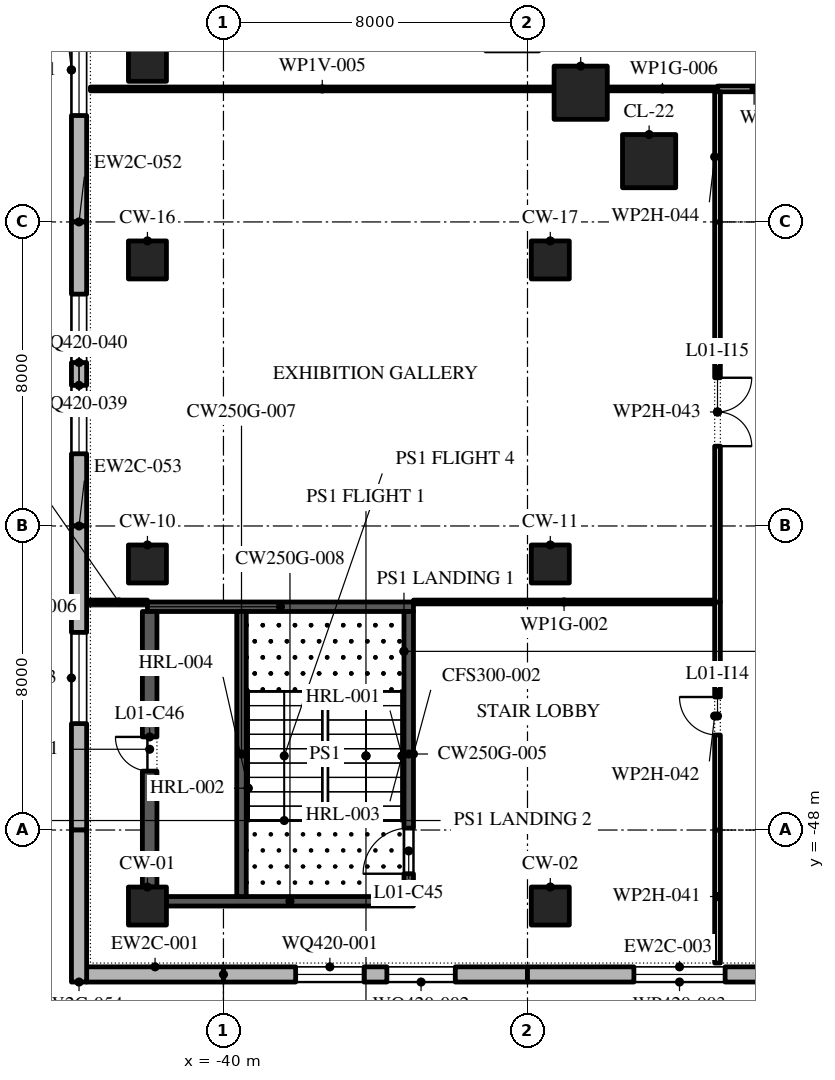
"""IFC4 building model, lengths in metres.
Left out: names, types, materials, properties, quantities, classifications, styles, units other than length and angle.
Written with IfcOpenShell. Run it as: python <this file> out.ifc"""

import sys

from ifc_helpers import new_model, si_unit, direction, frame, frame_2d, origin, origin_2d, place, context, subcontext, project, spatial, polyline, rectangle, outline, extrude, element, fill, save


model = new_model("IFC4")
c1 = context("Model", 3, precision=1e-05, world=origin(), true_north=direction((0.0, 1.0)))
c2 = subcontext(c1, "Body", "Model", "MODEL_VIEW")
j1 = project(units=[si_unit("LENGTHUNIT", "METRE"), si_unit("PLANEANGLEUNIT", "RADIAN")], contexts=[c1])
p1 = place(None, origin())
s1 = spatial("IfcSite", under=j1, at=p1, CompositionType="ELEMENT")
p2 = place(p1, origin())
s2 = spatial("IfcBuilding", under=s1, at=p2, CompositionType="ELEMENT")
p3 = place(p2, frame((0.0, 0.0, 8.0)))
s3 = spatial("IfcBuildingStorey", under=s2, at=p3, CompositionType="ELEMENT", Elevation=8.0)
for number, where, z_axis, x_axis in (
    (1, (-42.0, -50.0, 0.0), (0.0, 0.0, 1.0), (1.0, 0.0, 0.0)),
    (2, (-31.4, -50.0, 0.0), (0.0, 0.0, 1.0), (1.0, 0.0, 0.0)),
    (3, (-42.0, -41.0, 0.0), (0.0, 0.0, 1.0), (1.0, 0.0, 0.0)),
    (4, (-31.4, -41.0, 0.0), (0.0, 0.0, 1.0), (1.0, 0.0, 0.0)),
    (5, (-42.0, -33.0, 0.0), (0.0, 0.0, 1.0), (1.0, 0.0, 0.0)),
    (6, (-31.4, -33.0, 0.0), (0.0, 0.0, 1.0), (1.0, 0.0, 0.0)),
):
    element("IfcColumn", number, at=place(p3, frame(where, z_axis=z_axis, x_axis=x_axis)), inside=s3, PredefinedType="COLUMN", context=c2, shape_type="SweptSolid", body=[
        extrude(rectangle(XDim=1.0, YDim=1.0, at=origin_2d()), origin(), (0.0, 0.0, 1.0), 6.0),
    ])
for number, where, z_axis, x_axis in (
    (7, (-28.8, -30.4, 0.0), (0.0, 0.0, 1.0), (1.0, 0.0, 0.0)),
    (8, (-30.6, -28.6, 0.0), (0.0, 0.0, 1.0), (1.0, 0.0, 0.0)),
):
    element("IfcColumn", number, at=place(p3, frame(where, z_axis=z_axis, x_axis=x_axis)), inside=s3, PredefinedType="COLUMN", context=c2, shape_type="SweptSolid", body=[
        extrude(rectangle(XDim=1.4, YDim=1.4, at=origin_2d()), origin(), (0.0, 0.0, 1.0), 6.0),
    ])
p4 = place(p3, frame((-42.0, -27.8, 0.0), z_axis=(0.0, 0.0, 1.0), x_axis=(1.0, 0.0, 0.0)))
e9 = element("IfcColumn", 9, at=p4, inside=s3, PredefinedType="COLUMN", context=c2, shape_type="SweptSolid", body=[
    extrude(rectangle(XDim=1.0, YDim=1.0, at=origin_2d()), origin(), (0.0, 0.0, 1.0), 6.0),
])
p5 = place(p3, frame((-43.6, -51.8, 0.0), z_axis=(0.0, 0.0, 1.0), x_axis=(1.0, 0.0, 0.0)))
e10 = element("IfcWall", 10, at=p5, inside=s3, PredefinedType="STANDARD", context=c2, shape_type="SweptSolid", body=[
    extrude(rectangle(XDim=3.6, YDim=0.4, at=frame_2d((1.8, 0.0))), origin(), (0.0, 0.0, 1.0), 5.7),
])
p6 = place(p3, frame((-40.0, -51.8, 0.0), z_axis=(0.0, 0.0, 1.0), x_axis=(1.0, 0.0, 0.0)))
e11 = element("IfcWall", 11, at=p6, inside=s3, PredefinedType="STANDARD", context=c2, shape_type="SweptSolid", body=[
    extrude(rectangle(XDim=8.0, YDim=0.4, at=frame_2d((4.0, 0.0))), origin(), (0.0, 0.0, 1.0), 5.7),
])
p7 = place(p6, frame((1.9, 0.0, 0.9)))
e12 = element("IfcOpeningElement", 12, at=p7, cuts=e11, PredefinedType="OPENING", context=c2, shape_type="SweptSolid", body=[
    extrude(outline(polyline([(0.0, 0.0), (1.8, 0.0), (1.8, 2.641), (1.785, 2.876), (1.739, 3.107), (1.663, 3.33), (1.559, 3.541), (1.428, 3.737), (1.273, 3.914), (1.096, 4.069), (0.9, 4.2), (0.704, 4.069), (0.527, 3.914), (0.372, 3.737), (0.241, 3.541), (0.137, 3.33), (0.061, 3.107), (0.015, 2.876), (0.0, 2.641), (0.0, 0.0)])), frame((0.0, 0.21, 0.0), z_axis=(0.0, -1.0, 0.0), x_axis=(1.0, 0.0, 0.0)), (0.0, 0.0, 1.0), 0.42),
])
p8 = place(p6, frame((4.3, 0.0, 0.9)))
e13 = element("IfcOpeningElement", 13, at=p8, cuts=e11, PredefinedType="OPENING", context=c2, shape_type="SweptSolid", body=[
    extrude(outline(polyline([(0.0, 0.0), (1.8, 0.0), (1.8, 2.641), (1.785, 2.876), (1.739, 3.107), (1.663, 3.33), (1.559, 3.541), (1.428, 3.737), (1.273, 3.914), (1.096, 4.069), (0.9, 4.2), (0.704, 4.069), (0.527, 3.914), (0.372, 3.737), (0.241, 3.541), (0.137, 3.33), (0.061, 3.107), (0.015, 2.876), (0.0, 2.641), (0.0, 0.0)])), frame((0.0, 0.21, 0.0), z_axis=(0.0, -1.0, 0.0), x_axis=(1.0, 0.0, 0.0)), (0.0, 0.0, 1.0), 0.42),
])
p9 = place(p3, frame((-32.0, -51.8, 0.0), z_axis=(0.0, 0.0, 1.0), x_axis=(1.0, 0.0, 0.0)))
e14 = element("IfcWall", 14, at=p9, inside=s3, PredefinedType="STANDARD", context=c2, shape_type="SweptSolid", body=[
    extrude(rectangle(XDim=8.0, YDim=0.4, at=frame_2d((4.0, 0.0))), origin(), (0.0, 0.0, 1.0), 5.7),
])
p10 = place(p9, frame((2.8, 0.0, 0.9)))
e15 = element("IfcOpeningElement", 15, at=p10, cuts=e14, PredefinedType="OPENING", context=c2, shape_type="SweptSolid", body=[
    extrude(outline(polyline([(0.0, 0.0), (2.4, 0.0), (2.4, 2.122), (2.379, 2.435), (2.318, 2.743), (2.217, 3.04), (2.078, 3.322), (1.904, 3.583), (1.697, 3.819), (1.461, 4.026), (1.2, 4.2), (0.939, 4.026), (0.703, 3.819), (0.496, 3.583), (0.322, 3.322), (0.183, 3.04), (0.082, 2.743), (0.021, 2.435), (0.0, 2.122), (0.0, 0.0)])), frame((0.0, 0.21, 0.0), z_axis=(0.0, -1.0, 0.0), x_axis=(1.0, 0.0, 0.0)), (0.0, 0.0, 1.0), 0.42),
])
p11 = place(p3, frame((-43.8, -24.0, 0.0), z_axis=(0.0, 0.0, 1.0), x_axis=(0.0, -1.0, 0.0)))
e16 = element("IfcWall", 16, at=p11, inside=s3, PredefinedType="STANDARD", context=c2, shape_type="SweptSolid", body=[
    extrude(rectangle(XDim=8.0, YDim=0.4, at=frame_2d((4.0, 0.0))), origin(), (0.0, 0.0, 1.0), 5.7),
])
p12 = place(p11, frame((2.8, 0.0, 0.9)))
e17 = element("IfcOpeningElement", 17, at=p12, cuts=e16, PredefinedType="OPENING", context=c2, shape_type="SweptSolid", body=[
    extrude(outline(polyline([(0.0, 0.0), (2.4, 0.0), (2.4, 2.122), (2.379, 2.435), (2.318, 2.743), (2.217, 3.04), (2.078, 3.322), (1.904, 3.583), (1.697, 3.819), (1.461, 4.026), (1.2, 4.2), (0.939, 4.026), (0.703, 3.819), (0.496, 3.583), (0.322, 3.322), (0.183, 3.04), (0.082, 2.743), (0.021, 2.435), (0.0, 2.122), (0.0, 0.0)])), frame((0.0, 0.21, 0.0), z_axis=(0.0, -1.0, 0.0), x_axis=(1.0, 0.0, 0.0)), (0.0, 0.0, 1.0), 0.42),
])
p13 = place(p3, frame((-43.8, -32.0, 0.0), z_axis=(0.0, 0.0, 1.0), x_axis=(0.0, -1.0, 0.0)))
e18 = element("IfcWall", 18, at=p13, inside=s3, PredefinedType="STANDARD", context=c2, shape_type="SweptSolid", body=[
    extrude(rectangle(XDim=8.0, YDim=0.4, at=frame_2d((4.0, 0.0))), origin(), (0.0, 0.0, 1.0), 5.7),
])
p14 = place(p13, frame((1.9, 0.0, 0.9)))
e19 = element("IfcOpeningElement", 19, at=p14, cuts=e18, PredefinedType="OPENING", context=c2, shape_type="SweptSolid", body=[
    extrude(outline(polyline([(0.0, 0.0), (1.8, 0.0), (1.8, 2.641), (1.785, 2.876), (1.739, 3.107), (1.663, 3.33), (1.559, 3.541), (1.428, 3.737), (1.273, 3.914), (1.096, 4.069), (0.9, 4.2), (0.704, 4.069), (0.527, 3.914), (0.372, 3.737), (0.241, 3.541), (0.137, 3.33), (0.061, 3.107), (0.015, 2.876), (0.0, 2.641), (0.0, 0.0)])), frame((0.0, 0.21, 0.0), z_axis=(0.0, -1.0, 0.0), x_axis=(1.0, 0.0, 0.0)), (0.0, 0.0, 1.0), 0.42),
])
p15 = place(p13, frame((4.3, 0.0, 0.9)))
e20 = element("IfcOpeningElement", 20, at=p15, cuts=e18, PredefinedType="OPENING", context=c2, shape_type="SweptSolid", body=[
    extrude(outline(polyline([(0.0, 0.0), (1.8, 0.0), (1.8, 2.641), (1.785, 2.876), (1.739, 3.107), (1.663, 3.33), (1.559, 3.541), (1.428, 3.737), (1.273, 3.914), (1.096, 4.069), (0.9, 4.2), (0.704, 4.069), (0.527, 3.914), (0.372, 3.737), (0.241, 3.541), (0.137, 3.33), (0.061, 3.107), (0.015, 2.876), (0.0, 2.641), (0.0, 0.0)])), frame((0.0, 0.21, 0.0), z_axis=(0.0, -1.0, 0.0), x_axis=(1.0, 0.0, 0.0)), (0.0, 0.0, 1.0), 0.42),
])
p16 = place(p3, frame((-43.8, -40.0, 0.0), z_axis=(0.0, 0.0, 1.0), x_axis=(0.0, -1.0, 0.0)))
e21 = element("IfcWall", 21, at=p16, inside=s3, PredefinedType="STANDARD", context=c2, shape_type="SweptSolid", body=[
    extrude(rectangle(XDim=8.0, YDim=0.4, at=frame_2d((4.0, 0.0))), origin(), (0.0, 0.0, 1.0), 5.7),
])
p17 = place(p16, frame((2.8, 0.0, 0.9)))
e22 = element("IfcOpeningElement", 22, at=p17, cuts=e21, PredefinedType="OPENING", context=c2, shape_type="SweptSolid", body=[
    extrude(outline(polyline([(0.0, 0.0), (2.4, 0.0), (2.4, 2.122), (2.379, 2.435), (2.318, 2.743), (2.217, 3.04), (2.078, 3.322), (1.904, 3.583), (1.697, 3.819), (1.461, 4.026), (1.2, 4.2), (0.939, 4.026), (0.703, 3.819), (0.496, 3.583), (0.322, 3.322), (0.183, 3.04), (0.082, 2.743), (0.021, 2.435), (0.0, 2.122), (0.0, 0.0)])), frame((0.0, 0.21, 0.0), z_axis=(0.0, -1.0, 0.0), x_axis=(1.0, 0.0, 0.0)), (0.0, 0.0, 1.0), 0.42),
])
p18 = place(p3, frame((-43.8, -48.0, 0.0), z_axis=(0.0, 0.0, 1.0), x_axis=(0.0, -1.0, 0.0)))
e23 = element("IfcWall", 23, at=p18, inside=s3, PredefinedType="STANDARD", context=c2, shape_type="SweptSolid", body=[
    extrude(rectangle(XDim=4.0, YDim=0.4, at=frame_2d((2.0, 0.0))), origin(), (0.0, 0.0, 1.0), 5.7),
])
p19 = place(p3, frame((-41.5, -49.875, 0.0), z_axis=(0.0, 0.0, 1.0), x_axis=(1.0, 0.0, 0.0)))
e24 = element("IfcWall", 24, at=p19, inside=s3, PredefinedType="SHEAR", context=c2, shape_type="SweptSolid", body=[
    extrude(rectangle(XDim=6.5, YDim=0.25, at=frame_2d((3.25, 0.0))), origin(), (0.0, 0.0, 1.0), 5.7),
])
p20 = place(p3, frame((-42.0, -42.125, 0.0), z_axis=(0.0, 0.0, 1.0), x_axis=(1.0, 0.0, 0.0)))
e25 = element("IfcWall", 25, at=p20, inside=s3, PredefinedType="SHEAR", context=c2, shape_type="SweptSolid", body=[
    extrude(rectangle(XDim=7.0, YDim=0.25, at=frame_2d((3.5, 0.0))), origin(), (0.0, 0.0, 1.0), 5.7),
])
p21 = place(p3, frame((-41.942, -49.5, 0.0), z_axis=(0.0, 0.0, 1.0), x_axis=(0.0, 1.0, 0.0)))
e26 = element("IfcWall", 26, at=p21, inside=s3, PredefinedType="SHEAR", context=c2, shape_type="SweptSolid", body=[
    extrude(rectangle(XDim=7.25, YDim=0.384, at=frame_2d((3.625, 0.0))), origin(), (0.0, 0.0, 1.0), 5.7),
])
p22 = place(p21, frame((3.05, 0.0, 0.0)))
e27 = element("IfcOpeningElement", 27, at=p22, cuts=e26, PredefinedType="OPENING", context=c2, shape_type="SweptSolid", body=[
    extrude(rectangle(XDim=0.9, YDim=2.1, at=frame_2d((0.45, 1.05))), frame((0.0, 0.202, 0.0), z_axis=(0.0, -1.0, 0.0), x_axis=(1.0, 0.0, 0.0)), (0.0, 0.0, 1.0), 0.404),
])
p23 = place(p3, frame((-35.125, -49.75, 0.0), z_axis=(0.0, 0.0, 1.0), x_axis=(0.0, 1.0, 0.0)))
e28 = element("IfcWall", 28, at=p23, inside=s3, PredefinedType="SHEAR", context=c2, shape_type="SweptSolid", body=[
    extrude(rectangle(XDim=7.5, YDim=0.25, at=frame_2d((3.75, 0.0))), origin(), (0.0, 0.0, 1.0), 5.7),
])
p24 = place(p23, frame((0.6, 0.0, 0.0)))
e29 = element("IfcOpeningElement", 29, at=p24, cuts=e28, PredefinedType="OPENING", context=c2, shape_type="SweptSolid", body=[
    extrude(rectangle(XDim=1.2, YDim=2.1, at=frame_2d((0.6, 1.05))), frame((0.0, 0.135, 0.0), z_axis=(0.0, -1.0, 0.0), x_axis=(1.0, 0.0, 0.0)), (0.0, 0.0, 1.0), 0.27),
])
p25 = place(p3, frame((-39.525, -49.75, 0.0), z_axis=(0.0, 0.0, 1.0), x_axis=(0.0, 1.0, 0.0)))
e30 = element("IfcWall", 30, at=p25, inside=s3, PredefinedType="SHEAR", context=c2, shape_type="SweptSolid", body=[
    extrude(rectangle(XDim=7.5, YDim=0.25, at=frame_2d((3.75, 0.0))), origin(), (0.0, 0.0, 1.0), 5.7),
])
p26 = place(p3, frame((-43.5, -42.0, 0.0), z_axis=(0.0, 0.0, 1.0), x_axis=(1.0, 0.0, 0.0)))
e31 = element("IfcWall", 31, at=p26, inside=s3, PredefinedType="PARTITIONING", context=c2, shape_type="SweptSolid", body=[
    extrude(rectangle(XDim=1.5, YDim=0.1, at=frame_2d((0.75, 0.0))), origin(), (0.0, 0.0, 1.0), 5.7),
])
p27 = place(p3, frame((-35.0, -42.0, 0.0), z_axis=(0.0, 0.0, 1.0), x_axis=(1.0, 0.0, 0.0)))
e32 = element("IfcWall", 32, at=p27, inside=s3, PredefinedType="PARTITIONING", context=c2, shape_type="SweptSolid", body=[
    extrude(rectangle(XDim=7.925, YDim=0.1, at=frame_2d((3.962, 0.0))), origin(), (0.0, 0.0, 1.0), 5.7),
])
p28 = place(p3, frame((-43.5, -28.5, 0.0), z_axis=(0.0, 0.0, 1.0), x_axis=(1.0, 0.0, 0.0)))
e33 = element("IfcWall", 33, at=p28, inside=s3, PredefinedType="PARTITIONING", context=c2, shape_type="SweptSolid", body=[
    extrude(rectangle(XDim=12.2, YDim=0.1, at=frame_2d((6.1, 0.0))), origin(), (0.0, 0.0, 1.0), 5.164),
])
p29 = place(p3, frame((-29.9, -28.5, 0.0), z_axis=(0.0, 0.0, 1.0), x_axis=(1.0, 0.0, 0.0)))
e34 = element("IfcWall", 34, at=p29, inside=s3, PredefinedType="PARTITIONING", context=c2, shape_type="SweptSolid", body=[
    extrude(rectangle(XDim=2.9, YDim=0.1, at=frame_2d((1.45, 0.0))), origin(), (0.0, 0.0, 1.0), 5.7),
])
p30 = place(p3, frame((-27.0, -28.5, 0.0), z_axis=(0.0, 0.0, 1.0), x_axis=(1.0, 0.0, 0.0)))
e35 = element("IfcWall", 35, at=p30, inside=s3, PredefinedType="PARTITIONING", context=c2, shape_type="SweptSolid", body=[
    extrude(rectangle(XDim=1.925, YDim=0.15, at=frame_2d((0.962, 0.0))), origin(), (0.0, 0.0, 1.0), 5.7),
])
p31 = place(p3, frame((-27.0, -51.5, 0.0), z_axis=(0.0, 0.0, 1.0), x_axis=(0.0, 1.0, 0.0)))
e36 = element("IfcWall", 36, at=p31, inside=s3, PredefinedType="PARTITIONING", context=c2, shape_type="SweptSolid", body=[
    extrude(rectangle(XDim=3.5, YDim=0.15, at=frame_2d((1.75, 0.0))), origin(), (0.0, 0.0, 1.0), 5.7),
])
p32 = place(p3, frame((-27.0, -48.0, 0.0), z_axis=(0.0, 0.0, 1.0), x_axis=(0.0, 1.0, 0.0)))
e37 = element("IfcWall", 37, at=p32, inside=s3, PredefinedType="PARTITIONING", context=c2, shape_type="SweptSolid", body=[
    extrude(rectangle(XDim=6.0, YDim=0.15, at=frame_2d((3.0, 0.0))), origin(), (0.0, 0.0, 1.0), 5.7),
])
p33 = place(p32, frame((2.5, 0.0, 0.0)))
e38 = element("IfcOpeningElement", 38, at=p33, cuts=e37, PredefinedType="OPENING", context=c2, shape_type="SweptSolid", body=[
    extrude(rectangle(XDim=1.0, YDim=2.1, at=frame_2d((0.5, 1.05))), frame((0.0, 0.085, 0.0), z_axis=(0.0, -1.0, 0.0), x_axis=(1.0, 0.0, 0.0)), (0.0, 0.0, 1.0), 0.17),
])
p34 = place(p3, frame((-27.0, -42.0, 0.0), z_axis=(0.0, 0.0, 1.0), x_axis=(0.0, 1.0, 0.0)))
e39 = element("IfcWall", 39, at=p34, inside=s3, PredefinedType="PARTITIONING", context=c2, shape_type="SweptSolid", body=[
    extrude(rectangle(XDim=10.0, YDim=0.15, at=frame_2d((5.0, 0.0))), origin(), (0.0, 0.0, 1.0), 5.7),
])
p35 = place(p34, frame((4.1, 0.0, 0.0)))
e40 = element("IfcOpeningElement", 40, at=p35, cuts=e39, PredefinedType="OPENING", context=c2, shape_type="SweptSolid", body=[
    extrude(rectangle(XDim=1.8, YDim=2.1, at=frame_2d((0.9, 1.05))), frame((0.0, 0.085, 0.0), z_axis=(0.0, -1.0, 0.0), x_axis=(1.0, 0.0, 0.0)), (0.0, 0.0, 1.0), 0.17),
])
p36 = place(p3, frame((-27.0, -32.0, 0.0), z_axis=(0.0, 0.0, 1.0), x_axis=(0.0, 1.0, 0.0)))
e41 = element("IfcWall", 41, at=p36, inside=s3, PredefinedType="PARTITIONING", context=c2, shape_type="SweptSolid", body=[
    extrude(rectangle(XDim=3.425, YDim=0.15, at=frame_2d((1.712, 0.0))), origin(), (0.0, 0.0, 1.0), 5.7),
])
p37 = place(p7, origin())
e42 = element("IfcWindow", 42, at=p37, inside=s3, PartitioningType="DOUBLE_PANEL_VERTICAL", PredefinedType="WINDOW", context=c2, shape_type="SweptSolid", body=[
    extrude(outline(polyline([(0.0, 0.0), (1.8, 0.0), (1.8, 2.641), (1.785, 2.876), (1.739, 3.107), (1.663, 3.33), (1.559, 3.541), (1.428, 3.737), (1.273, 3.914), (1.096, 4.069), (0.9, 4.2), (0.704, 4.069), (0.527, 3.914), (0.372, 3.737), (0.241, 3.541), (0.137, 3.33), (0.061, 3.107), (0.015, 2.876), (0.0, 2.641), (0.0, 0.0)])), frame((0.0, 0.03, 0.0), z_axis=(0.0, -1.0, 0.0), x_axis=(1.0, 0.0, 0.0)), (0.0, 0.0, 1.0), 0.06),
])
fill(e12, e42)
p38 = place(p8, origin())
e43 = element("IfcWindow", 43, at=p38, inside=s3, PartitioningType="DOUBLE_PANEL_VERTICAL", PredefinedType="WINDOW", context=c2, shape_type="SweptSolid", body=[
    extrude(outline(polyline([(0.0, 0.0), (1.8, 0.0), (1.8, 2.641), (1.785, 2.876), (1.739, 3.107), (1.663, 3.33), (1.559, 3.541), (1.428, 3.737), (1.273, 3.914), (1.096, 4.069), (0.9, 4.2), (0.704, 4.069), (0.527, 3.914), (0.372, 3.737), (0.241, 3.541), (0.137, 3.33), (0.061, 3.107), (0.015, 2.876), (0.0, 2.641), (0.0, 0.0)])), frame((0.0, 0.03, 0.0), z_axis=(0.0, -1.0, 0.0), x_axis=(1.0, 0.0, 0.0)), (0.0, 0.0, 1.0), 0.06),
])
fill(e13, e43)
p39 = place(p10, origin())
e44 = element("IfcWindow", 44, at=p39, inside=s3, PartitioningType="DOUBLE_PANEL_VERTICAL", PredefinedType="WINDOW", context=c2, shape_type="SweptSolid", body=[
    extrude(outline(polyline([(0.0, 0.0), (2.4, 0.0), (2.4, 2.122), (2.379, 2.435), (2.318, 2.743), (2.217, 3.04), (2.078, 3.322), (1.904, 3.583), (1.697, 3.819), (1.461, 4.026), (1.2, 4.2), (0.939, 4.026), (0.703, 3.819), (0.496, 3.583), (0.322, 3.322), (0.183, 3.04), (0.082, 2.743), (0.021, 2.435), (0.0, 2.122), (0.0, 0.0)])), frame((0.0, 0.03, 0.0), z_axis=(0.0, -1.0, 0.0), x_axis=(1.0, 0.0, 0.0)), (0.0, 0.0, 1.0), 0.06),
])
fill(e15, e44)
p40 = place(p12, origin())
e45 = element("IfcWindow", 45, at=p40, inside=s3, PartitioningType="DOUBLE_PANEL_VERTICAL", PredefinedType="WINDOW", context=c2, shape_type="SweptSolid", body=[
    extrude(outline(polyline([(0.0, 0.0), (2.4, 0.0), (2.4, 2.122), (2.379, 2.435), (2.318, 2.743), (2.217, 3.04), (2.078, 3.322), (1.904, 3.583), (1.697, 3.819), (1.461, 4.026), (1.2, 4.2), (0.939, 4.026), (0.703, 3.819), (0.496, 3.583), (0.322, 3.322), (0.183, 3.04), (0.082, 2.743), (0.021, 2.435), (0.0, 2.122), (0.0, 0.0)])), frame((0.0, 0.03, 0.0), z_axis=(0.0, -1.0, 0.0), x_axis=(1.0, 0.0, 0.0)), (0.0, 0.0, 1.0), 0.06),
])
fill(e17, e45)
p41 = place(p14, origin())
e46 = element("IfcWindow", 46, at=p41, inside=s3, PartitioningType="DOUBLE_PANEL_VERTICAL", PredefinedType="WINDOW", context=c2, shape_type="SweptSolid", body=[
    extrude(outline(polyline([(0.0, 0.0), (1.8, 0.0), (1.8, 2.641), (1.785, 2.876), (1.739, 3.107), (1.663, 3.33), (1.559, 3.541), (1.428, 3.737), (1.273, 3.914), (1.096, 4.069), (0.9, 4.2), (0.704, 4.069), (0.527, 3.914), (0.372, 3.737), (0.241, 3.541), (0.137, 3.33), (0.061, 3.107), (0.015, 2.876), (0.0, 2.641), (0.0, 0.0)])), frame((0.0, 0.03, 0.0), z_axis=(0.0, -1.0, 0.0), x_axis=(1.0, 0.0, 0.0)), (0.0, 0.0, 1.0), 0.06),
])
fill(e19, e46)
p42 = place(p15, origin())
e47 = element("IfcWindow", 47, at=p42, inside=s3, PartitioningType="DOUBLE_PANEL_VERTICAL", PredefinedType="WINDOW", context=c2, shape_type="SweptSolid", body=[
    extrude(outline(polyline([(0.0, 0.0), (1.8, 0.0), (1.8, 2.641), (1.785, 2.876), (1.739, 3.107), (1.663, 3.33), (1.559, 3.541), (1.428, 3.737), (1.273, 3.914), (1.096, 4.069), (0.9, 4.2), (0.704, 4.069), (0.527, 3.914), (0.372, 3.737), (0.241, 3.541), (0.137, 3.33), (0.061, 3.107), (0.015, 2.876), (0.0, 2.641), (0.0, 0.0)])), frame((0.0, 0.03, 0.0), z_axis=(0.0, -1.0, 0.0), x_axis=(1.0, 0.0, 0.0)), (0.0, 0.0, 1.0), 0.06),
])
fill(e20, e47)
p43 = place(p17, origin())
e48 = element("IfcWindow", 48, at=p43, inside=s3, PartitioningType="DOUBLE_PANEL_VERTICAL", PredefinedType="WINDOW", context=c2, shape_type="SweptSolid", body=[
    extrude(outline(polyline([(0.0, 0.0), (2.4, 0.0), (2.4, 2.122), (2.379, 2.435), (2.318, 2.743), (2.217, 3.04), (2.078, 3.322), (1.904, 3.583), (1.697, 3.819), (1.461, 4.026), (1.2, 4.2), (0.939, 4.026), (0.703, 3.819), (0.496, 3.583), (0.322, 3.322), (0.183, 3.04), (0.082, 2.743), (0.021, 2.435), (0.0, 2.122), (0.0, 0.0)])), frame((0.0, 0.03, 0.0), z_axis=(0.0, -1.0, 0.0), x_axis=(1.0, 0.0, 0.0)), (0.0, 0.0, 1.0), 0.06),
])
fill(e22, e48)
p44 = place(p24, origin())
e49 = element("IfcDoor", 49, at=p44, inside=s3, OperationType="SINGLE_SWING_RIGHT", PredefinedType="DOOR", context=c2, shape_type="SweptSolid", body=[
    extrude(rectangle(XDim=1.2, YDim=2.1, at=frame_2d((0.6, 1.05))), frame((0.0, 0.025, 0.0), z_axis=(0.0, -1.0, 0.0), x_axis=(1.0, 0.0, 0.0)), (0.0, 0.0, 1.0), 0.05),
])
fill(e29, e49)
p45 = place(p22, origin())
e50 = element("IfcDoor", 50, at=p45, inside=s3, OperationType="SINGLE_SWING_LEFT", PredefinedType="DOOR", context=c2, shape_type="SweptSolid", body=[
    extrude(rectangle(XDim=0.9, YDim=2.1, at=frame_2d((0.45, 1.05))), frame((0.0, -0.142, 0.0), z_axis=(0.0, -1.0, 0.0), x_axis=(1.0, 0.0, 0.0)), (0.0, 0.0, 1.0), 0.05),
])
fill(e27, e50)
p46 = place(p33, origin())
e51 = element("IfcDoor", 51, at=p46, inside=s3, OperationType="SINGLE_SWING_LEFT", PredefinedType="DOOR", context=c2, shape_type="SweptSolid", body=[
    extrude(rectangle(XDim=1.0, YDim=2.1, at=frame_2d((0.5, 1.05))), frame((0.0, 0.025, 0.0), z_axis=(0.0, -1.0, 0.0), x_axis=(1.0, 0.0, 0.0)), (0.0, 0.0, 1.0), 0.05),
])
fill(e38, e51)
p47 = place(p35, frame((1.8, 0.0, 0.0), z_axis=(0.0, 0.0, 1.0), x_axis=(-1.0, 0.0, 0.0)))
e52 = element("IfcDoor", 52, at=p47, inside=s3, OperationType="SINGLE_SWING_RIGHT", PredefinedType="DOOR", context=c2, shape_type="SweptSolid", body=[
    extrude(rectangle(XDim=1.8, YDim=2.1, at=frame_2d((0.9, 1.05))), frame((0.0, 0.025, 0.0), z_axis=(0.0, -1.0, 0.0), x_axis=(1.0, 0.0, 0.0)), (0.0, 0.0, 1.0), 0.05),
])
fill(e40, e52)
save(model, sys.argv[1])
